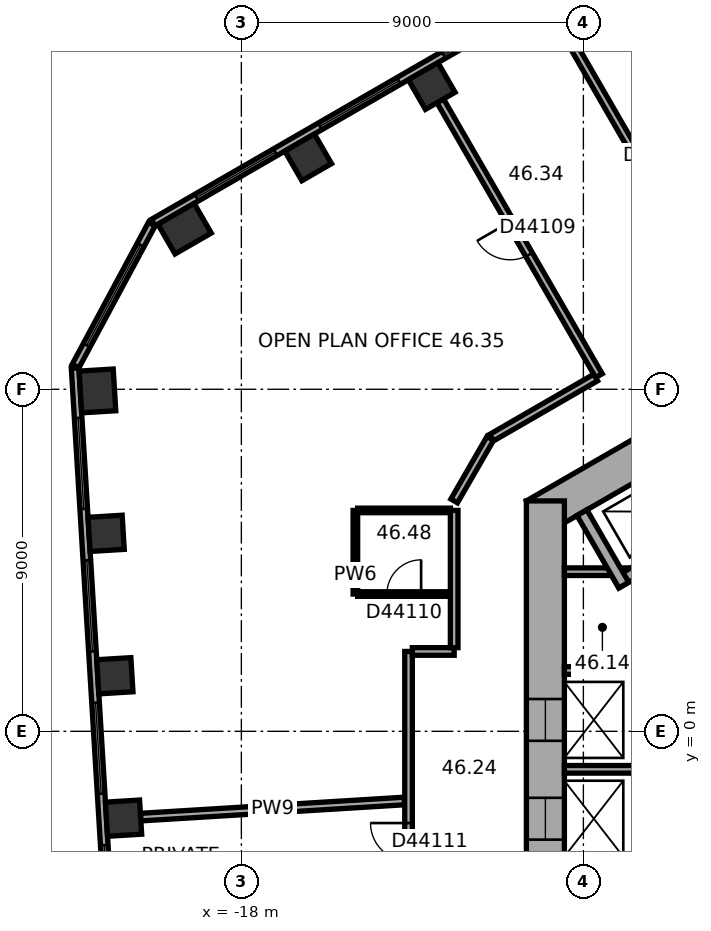
"""IFC4 building model, lengths in metres.
Left out: names, types, materials, properties, quantities, classifications, styles, units other than length and angle.
Written with IfcOpenShell. Run it as: python <this file> out.ifc"""

import sys

from ifc_helpers import new_model, si_unit, direction, frame, frame_2d, origin, origin_2d, place, context, subcontext, project, spatial, rectangle, extrude, element, fill, save


model = new_model("IFC4")
c1 = context("Model", 3, precision=1e-05, world=origin(), true_north=direction((0.0, 1.0)))
c2 = subcontext(c1, "Body", "Model", "MODEL_VIEW")
j1 = project(units=[si_unit("LENGTHUNIT", "METRE"), si_unit("PLANEANGLEUNIT", "RADIAN")], contexts=[c1])
p1 = place(None, origin())
s1 = spatial("IfcSite", under=j1, at=p1, CompositionType="ELEMENT")
p2 = place(p1, origin())
s2 = spatial("IfcBuilding", under=s1, at=p2, CompositionType="ELEMENT")
p3 = place(p2, frame((0.0, 0.0, 187.3)))
s3 = spatial("IfcBuildingStorey", under=s2, at=p3, CompositionType="ELEMENT", Elevation=187.3)
for number, where, z_axis, x_axis in (
    (1, (-12.991, 16.979, 0.0), (0.0, 0.0, 1.0), (-0.866, -0.5, 0.0)),
    (2, (-16.242, 15.102, 0.0), (0.0, 0.0, 1.0), (-0.866, -0.5, 0.0)),
):
    element("IfcColumn", number, at=place(p3, frame(where, z_axis=z_axis, x_axis=x_axis)), inside=s3, PredefinedType="COLUMN", context=c2, shape_type="SweptSolid", body=[
        extrude(rectangle(XDim=0.9, YDim=0.9, at=origin_2d()), origin(), (0.0, 0.0, 1.0), 3.7),
    ])
for number, where, z_axis, x_axis in (
    (3, (-19.494, 13.225, 0.0), (0.0, 0.0, 1.0), (-0.866, -0.5, 0.0)),
    (4, (-21.787, 8.956, 0.0), (0.0, 0.0, 1.0), (0.061, -0.998, 0.0)),
):
    element("IfcColumn", number, at=place(p3, frame(where, z_axis=z_axis, x_axis=x_axis)), inside=s3, PredefinedType="COLUMN", context=c2, shape_type="SweptSolid", body=[
        extrude(rectangle(XDim=1.1, YDim=0.9, at=origin_2d()), origin(), (0.0, 0.0, 1.0), 3.7),
    ])
for number, where, z_axis, x_axis in (
    (5, (-21.558, 5.209, 0.0), (0.0, 0.0, 1.0), (0.061, -0.998, 0.0)),
    (6, (-21.329, 1.462, 0.0), (0.0, 0.0, 1.0), (0.061, -0.998, 0.0)),
    (7, (-21.1, -2.285, 0.0), (0.0, 0.0, 1.0), (0.061, -0.998, 0.0)),
):
    element("IfcColumn", number, at=place(p3, frame(where, z_axis=z_axis, x_axis=x_axis)), inside=s3, PredefinedType="COLUMN", context=c2, shape_type="SweptSolid", body=[
        extrude(rectangle(XDim=0.9, YDim=0.9, at=origin_2d()), origin(), (0.0, 0.0, 1.0), 3.7),
    ])
p4 = place(p3, frame((0.25, 11.691, 0.0), z_axis=(0.0, 0.0, 1.0), x_axis=(-0.866022616891, -0.50000482701, 0.0)))
e8 = element("IfcWall", 8, at=p4, inside=s3, PredefinedType="SHEAR", context=c2, shape_type="SweptSolid", body=[
    extrude(rectangle(XDim=12.125, YDim=1.0, at=frame_2d((6.062, 0.0))), origin(), (0.0, 0.0, 1.0), 3.7),
])
p5 = place(p4, frame((6.262, 0.0, 0.0)))
e9 = element("IfcOpeningElement", 9, at=p5, cuts=e8, PredefinedType="OPENING", context=c2, shape_type="SweptSolid", body=[
    extrude(rectangle(XDim=1.5, YDim=2.1, at=frame_2d((0.75, 1.05))), frame((0.0, 0.51, 0.0), z_axis=(0.0, -1.0, 0.0), x_axis=(1.0, 0.0, 0.0)), (0.0, 0.0, 1.0), 1.02),
])
p6 = place(p4, frame((1.812, 0.0, 0.0)))
e10 = element("IfcOpeningElement", 10, at=p6, cuts=e8, PredefinedType="OPENING", context=c2, shape_type="SweptSolid", body=[
    extrude(rectangle(XDim=0.9, YDim=2.1, at=frame_2d((0.45, 1.05))), frame((0.0, 0.51, 0.0), z_axis=(0.0, -1.0, 0.0), x_axis=(1.0, 0.0, 0.0)), (0.0, 0.0, 1.0), 1.02),
])
p7 = place(p4, frame((4.412, 0.0, 0.0)))
e11 = element("IfcOpeningElement", 11, at=p7, cuts=e8, PredefinedType="OPENING", context=c2, shape_type="SweptSolid", body=[
    extrude(rectangle(XDim=0.9, YDim=2.1, at=frame_2d((0.45, 1.05))), frame((0.0, 0.51, 0.0), z_axis=(0.0, -1.0, 0.0), x_axis=(1.0, 0.0, 0.0)), (0.0, 0.0, 1.0), 1.02),
])
p8 = place(p3, frame((-10.0, 6.062, 0.0), z_axis=(0.0, 0.0, 1.0), x_axis=(0.0, -1.0, 0.0)))
e12 = element("IfcWall", 12, at=p8, inside=s3, PredefinedType="SHEAR", context=c2, shape_type="SweptSolid", body=[
    extrude(rectangle(XDim=12.125, YDim=1.0, at=frame_2d((6.062, 0.0))), origin(), (0.0, 0.0, 1.0), 3.7),
])
p9 = place(p8, frame((5.212, 0.0, 0.0)))
e13 = element("IfcOpeningElement", 13, at=p9, cuts=e12, PredefinedType="OPENING", context=c2, shape_type="SweptSolid", body=[
    extrude(rectangle(XDim=1.1, YDim=2.1, at=frame_2d((0.55, 1.05))), frame((0.0, 0.51, 0.0), z_axis=(0.0, -1.0, 0.0), x_axis=(1.0, 0.0, 0.0)), (0.0, 0.0, 1.0), 1.02),
])
p10 = place(p8, frame((7.812, 0.0, 0.0)))
e14 = element("IfcOpeningElement", 14, at=p10, cuts=e12, PredefinedType="OPENING", context=c2, shape_type="SweptSolid", body=[
    extrude(rectangle(XDim=1.1, YDim=2.1, at=frame_2d((0.55, 1.05))), frame((0.0, 0.51, 0.0), z_axis=(0.0, -1.0, 0.0), x_axis=(1.0, 0.0, 0.0)), (0.0, 0.0, 1.0), 1.02),
])
p11 = place(p3, frame((-2.961, 23.405, 0.0), z_axis=(0.0, 0.0, 1.0), x_axis=(-0.866023315909, -0.500003616288, 0.0)))
e15 = element("IfcWall", 15, at=p11, inside=s3, PredefinedType="STANDARD", context=c2, shape_type="SweptSolid", body=[
    extrude(rectangle(XDim=20.044, YDim=0.2, at=frame_2d((10.022, 0.0))), origin(), (0.0, 0.0, 1.0), 3.7),
])
p12 = place(p11, frame((1.314, 0.0, 0.9)))
e16 = element("IfcOpeningElement", 16, at=p12, cuts=e15, PredefinedType="OPENING", context=c2, shape_type="SweptSolid", body=[
    extrude(rectangle(XDim=2.4, YDim=2.0, at=frame_2d((1.2, 1.0))), frame((0.0, 0.11, 0.0), z_axis=(0.0, -1.0, 0.0), x_axis=(1.0, 0.0, 0.0)), (0.0, 0.0, 1.0), 0.22),
])
p13 = place(p11, frame((5.069, 0.0, 0.9)))
e17 = element("IfcOpeningElement", 17, at=p13, cuts=e15, PredefinedType="OPENING", context=c2, shape_type="SweptSolid", body=[
    extrude(rectangle(XDim=2.4, YDim=2.0, at=frame_2d((1.2, 1.0))), frame((0.0, 0.11, 0.0), z_axis=(0.0, -1.0, 0.0), x_axis=(1.0, 0.0, 0.0)), (0.0, 0.0, 1.0), 0.22),
])
p14 = place(p11, frame((8.823, 0.0, 0.9)))
e18 = element("IfcOpeningElement", 18, at=p14, cuts=e15, PredefinedType="OPENING", context=c2, shape_type="SweptSolid", body=[
    extrude(rectangle(XDim=2.4, YDim=2.0, at=frame_2d((1.2, 1.0))), frame((0.0, 0.11, 0.0), z_axis=(0.0, -1.0, 0.0), x_axis=(1.0, 0.0, 0.0)), (0.0, 0.0, 1.0), 0.22),
])
p15 = place(p11, frame((12.577, 0.0, 0.9)))
e19 = element("IfcOpeningElement", 19, at=p15, cuts=e15, PredefinedType="OPENING", context=c2, shape_type="SweptSolid", body=[
    extrude(rectangle(XDim=2.4, YDim=2.0, at=frame_2d((1.2, 1.0))), frame((0.0, 0.11, 0.0), z_axis=(0.0, -1.0, 0.0), x_axis=(1.0, 0.0, 0.0)), (0.0, 0.0, 1.0), 0.22),
])
p16 = place(p11, frame((16.331, 0.0, 0.9)))
e20 = element("IfcOpeningElement", 20, at=p16, cuts=e15, PredefinedType="OPENING", context=c2, shape_type="SweptSolid", body=[
    extrude(rectangle(XDim=2.4, YDim=2.0, at=frame_2d((1.2, 1.0))), frame((0.0, 0.11, 0.0), z_axis=(0.0, -1.0, 0.0), x_axis=(1.0, 0.0, 0.0)), (0.0, 0.0, 1.0), 0.22),
])
p17 = place(p3, frame((-20.357, 13.344, 0.0), z_axis=(0.0, 0.0, 1.0), x_axis=(-0.473288913494, -0.880907262068, 0.0)))
e21 = element("IfcWall", 21, at=p17, inside=s3, PredefinedType="STANDARD", context=c2, shape_type="SweptSolid", body=[
    extrude(rectangle(XDim=4.238, YDim=0.2, at=frame_2d((2.119, 0.0))), origin(), (0.0, 0.0, 1.0), 3.7),
])
p18 = place(p17, frame((0.619, 0.0, 0.9)))
e22 = element("IfcOpeningElement", 22, at=p18, cuts=e21, PredefinedType="OPENING", context=c2, shape_type="SweptSolid", body=[
    extrude(rectangle(XDim=3.0, YDim=2.0, at=frame_2d((1.5, 1.0))), frame((0.0, 0.11, 0.0), z_axis=(0.0, -1.0, 0.0), x_axis=(1.0, 0.0, 0.0)), (0.0, 0.0, 1.0), 0.22),
])
p19 = place(p3, frame((-22.375, 9.557, 0.0), z_axis=(0.0, 0.0, 1.0), x_axis=(0.061036015339, -0.998135564356, 0.0)))
e23 = element("IfcWall", 23, at=p19, inside=s3, PredefinedType="STANDARD", context=c2, shape_type="SweptSolid", body=[
    extrude(rectangle(XDim=20.044, YDim=0.2, at=frame_2d((10.022, 0.0))), origin(), (0.0, 0.0, 1.0), 3.7),
])
p20 = place(p19, frame((1.313, 0.0, 0.9)))
e24 = element("IfcOpeningElement", 24, at=p20, cuts=e23, PredefinedType="OPENING", context=c2, shape_type="SweptSolid", body=[
    extrude(rectangle(XDim=2.4, YDim=2.0, at=frame_2d((1.2, 1.0))), frame((0.0, 0.11, 0.0), z_axis=(0.0, -1.0, 0.0), x_axis=(1.0, 0.0, 0.0)), (0.0, 0.0, 1.0), 0.22),
])
p21 = place(p19, frame((5.067, 0.0, 0.9)))
e25 = element("IfcOpeningElement", 25, at=p21, cuts=e23, PredefinedType="OPENING", context=c2, shape_type="SweptSolid", body=[
    extrude(rectangle(XDim=2.4, YDim=2.0, at=frame_2d((1.2, 1.0))), frame((0.0, 0.11, 0.0), z_axis=(0.0, -1.0, 0.0), x_axis=(1.0, 0.0, 0.0)), (0.0, 0.0, 1.0), 0.22),
])
p22 = place(p19, frame((8.821, 0.0, 0.9)))
e26 = element("IfcOpeningElement", 26, at=p22, cuts=e23, PredefinedType="OPENING", context=c2, shape_type="SweptSolid", body=[
    extrude(rectangle(XDim=2.4, YDim=2.0, at=frame_2d((1.2, 1.0))), frame((0.0, 0.11, 0.0), z_axis=(0.0, -1.0, 0.0), x_axis=(1.0, 0.0, 0.0)), (0.0, 0.0, 1.0), 0.22),
])
p23 = place(p19, frame((12.575, 0.0, 0.9)))
e27 = element("IfcOpeningElement", 27, at=p23, cuts=e23, PredefinedType="OPENING", context=c2, shape_type="SweptSolid", body=[
    extrude(rectangle(XDim=2.4, YDim=2.0, at=frame_2d((1.2, 1.0))), frame((0.0, 0.11, 0.0), z_axis=(0.0, -1.0, 0.0), x_axis=(1.0, 0.0, 0.0)), (0.0, 0.0, 1.0), 0.22),
])
p24 = place(p19, frame((16.329, 0.0, 0.9)))
e28 = element("IfcOpeningElement", 28, at=p24, cuts=e23, PredefinedType="OPENING", context=c2, shape_type="SweptSolid", body=[
    extrude(rectangle(XDim=2.4, YDim=2.0, at=frame_2d((1.2, 1.0))), frame((0.0, 0.11, 0.0), z_axis=(0.0, -1.0, 0.0), x_axis=(1.0, 0.0, 0.0)), (0.0, 0.0, 1.0), 0.22),
])
for number, where, z_axis, x_axis in (
    (29, (-7.3, 4.2, 0.0), (0.0, 0.0, 1.0), (-1.0, 0.0, 0.0)),
    (30, (-7.3, 1.6, 0.0), (0.0, 0.0, 1.0), (-1.0, 0.0, 0.0)),
    (31, (-7.3, -1.0, 0.0), (0.0, 0.0, 1.0), (-1.0, 0.0, 0.0)),
):
    element("IfcWall", number, at=place(p3, frame(where, z_axis=z_axis, x_axis=x_axis)), inside=s3, PredefinedType="PARTITIONING", context=c2, shape_type="SweptSolid", body=[
        extrude(rectangle(XDim=2.2, YDim=0.2, at=frame_2d((1.1, 0.0))), origin(), (0.0, 0.0, 1.0), 3.42),
    ])
p25 = place(p3, frame((-5.24, 5.577, 0.0), z_axis=(0.0, 0.0, 1.0), x_axis=(-0.866014461049, -0.500018952895, 0.0)))
e32 = element("IfcWall", 32, at=p25, inside=s3, PredefinedType="SHEAR", context=c2, shape_type="SweptSolid", body=[
    extrude(rectangle(XDim=3.35, YDim=0.3, at=frame_2d((1.675, 0.0))), origin(), (0.0, 0.0, 1.0), 3.42),
])
p26 = place(p3, frame((-7.937, 3.847, 0.0), z_axis=(0.0, 0.0, 1.0), x_axis=(-0.50002983664, 0.866008176907, 0.0)))
e33 = element("IfcWall", 33, at=p26, inside=s3, PredefinedType="SHEAR", context=c2, shape_type="SweptSolid", body=[
    extrude(rectangle(XDim=2.2, YDim=0.3, at=frame_2d((1.1, 0.0))), origin(), (0.0, 0.0, 1.0), 3.42),
])
p27 = place(p3, frame((-20.651, -2.258, 0.0), z_axis=(0.0, 0.0, 1.0), x_axis=(0.998133960965, 0.061062230286, 0.0)))
e34 = element("IfcWall", 34, at=p27, inside=s3, PredefinedType="PARTITIONING", context=c2, shape_type="SweptSolid", body=[
    extrude(rectangle(XDim=6.953, YDim=0.2, at=frame_2d((3.477, 0.0))), origin(), (0.0, 0.0, 1.0), 3.42),
])
p28 = place(p3, frame((-15.0, 3.612, 0.0), z_axis=(0.0, 0.0, 1.0), x_axis=(0.0, 1.0, 0.0)))
e35 = element("IfcWall", 35, at=p28, inside=s3, PredefinedType="PARTITIONING", context=c2, shape_type="SweptSolid", body=[
    extrude(rectangle(XDim=2.2, YDim=0.12, at=frame_2d((1.1, 0.0))), origin(), (0.0, 0.0, 1.0), 3.42),
])
p29 = place(p3, frame((-14.94, 5.812, 0.0), z_axis=(0.0, 0.0, 1.0), x_axis=(1.0, 0.0, 0.0)))
e36 = element("IfcWall", 36, at=p29, inside=s3, PredefinedType="PARTITIONING", context=c2, shape_type="SweptSolid", body=[
    extrude(rectangle(XDim=2.44, YDim=0.12, at=frame_2d((1.22, 0.0))), origin(), (0.0, 0.0, 1.0), 3.42),
])
p30 = place(p3, frame((-13.601, 2.101, 0.0), z_axis=(0.0, 0.0, 1.0), x_axis=(0.0, -1.0, 0.0)))
e37 = element("IfcWall", 37, at=p30, inside=s3, PredefinedType="PARTITIONING", context=c2, shape_type="SweptSolid", body=[
    extrude(rectangle(XDim=6.102, YDim=0.2, at=frame_2d((3.051, 0.0))), origin(), (0.0, 0.0, 1.0), 3.42),
])
p31 = place(p30, frame((4.515, 0.0, 0.0)))
e38 = element("IfcOpeningElement", 38, at=p31, cuts=e37, PredefinedType="OPENING", context=c2, shape_type="SweptSolid", body=[
    extrude(rectangle(XDim=1.0, YDim=2.1, at=frame_2d((0.5, 1.05))), frame((0.0, 0.11, 0.0), z_axis=(0.0, -1.0, 0.0), x_axis=(1.0, 0.0, 0.0)), (0.0, 0.0, 1.0), 0.22),
])
p32 = place(p3, frame((-12.766, 16.589, 0.0), z_axis=(0.0, 0.0, 1.0), x_axis=(0.500010139422, -0.866019549707, 0.0)))
e39 = element("IfcWall", 39, at=p32, inside=s3, PredefinedType="PARTITIONING", context=c2, shape_type="SweptSolid", body=[
    extrude(rectangle(XDim=8.35, YDim=0.2, at=frame_2d((4.175, 0.0))), origin(), (0.0, 0.0, 1.0), 3.42),
])
p33 = place(p32, frame((3.675, 0.0, 0.0)))
e40 = element("IfcOpeningElement", 40, at=p33, cuts=e39, PredefinedType="OPENING", context=c2, shape_type="SweptSolid", body=[
    extrude(rectangle(XDim=1.0, YDim=2.1, at=frame_2d((0.5, 1.05))), frame((0.0, 0.11, 0.0), z_axis=(0.0, -1.0, 0.0), x_axis=(1.0, 0.0, 0.0)), (0.0, 0.0, 1.0), 0.22),
])
p34 = place(p3, frame((-12.5, 3.612, 0.0), z_axis=(0.0, 0.0, 1.0), x_axis=(-1.0, 0.0, 0.0)))
e41 = element("IfcWall", 41, at=p34, inside=s3, PredefinedType="PARTITIONING", context=c2, shape_type="SweptSolid", body=[
    extrude(rectangle(XDim=2.44, YDim=0.12, at=frame_2d((1.22, 0.0))), origin(), (0.0, 0.0, 1.0), 3.42),
])
p35 = place(p34, frame((0.77, 0.0, 0.0)))
e42 = element("IfcOpeningElement", 42, at=p35, cuts=e41, PredefinedType="OPENING", context=c2, shape_type="SweptSolid", body=[
    extrude(rectangle(XDim=0.9, YDim=2.1, at=frame_2d((0.45, 1.05))), frame((0.0, 0.07, 0.0), z_axis=(0.0, -1.0, 0.0), x_axis=(1.0, 0.0, 0.0)), (0.0, 0.0, 1.0), 0.14),
])
p36 = place(p3, frame((-12.4, 2.101, 0.0), z_axis=(0.0, 0.0, 1.0), x_axis=(-1.0, 0.0, 0.0)))
e43 = element("IfcWall", 43, at=p36, inside=s3, PredefinedType="PARTITIONING", context=c2, shape_type="SweptSolid", body=[
    extrude(rectangle(XDim=1.101, YDim=0.2, at=frame_2d((0.551, 0.0))), origin(), (0.0, 0.0, 1.0), 3.42),
])
p37 = place(p3, frame((-12.4, 5.812, 0.0), z_axis=(0.0, 0.0, 1.0), x_axis=(0.0, -1.0, 0.0)))
e44 = element("IfcWall", 44, at=p37, inside=s3, PredefinedType="PARTITIONING", context=c2, shape_type="SweptSolid", body=[
    extrude(rectangle(XDim=3.611, YDim=0.2, at=frame_2d((1.806, 0.0))), origin(), (0.0, 0.0, 1.0), 3.42),
])
p38 = place(p3, frame((-11.45, 7.708, 0.0), z_axis=(0.0, 0.0, 1.0), x_axis=(-0.500022797313, -0.86601224135, 0.0)))
e45 = element("IfcWall", 45, at=p38, inside=s3, PredefinedType="PARTITIONING", context=c2, shape_type="SweptSolid", body=[
    extrude(rectangle(XDim=1.9, YDim=0.2, at=frame_2d((0.95, 0.0))), origin(), (0.0, 0.0, 1.0), 3.42),
])
p39 = place(p3, frame((-9.515, 18.466, 0.0), z_axis=(0.0, 0.0, 1.0), x_axis=(0.500010139422, -0.866019549707, 0.0)))
e46 = element("IfcWall", 46, at=p39, inside=s3, PredefinedType="PARTITIONING", context=c2, shape_type="SweptSolid", body=[
    extrude(rectangle(XDim=8.35, YDim=0.2, at=frame_2d((4.175, 0.0))), origin(), (0.0, 0.0, 1.0), 2.87),
])
p40 = place(p39, frame((3.675, 0.0, 0.0)))
e47 = element("IfcOpeningElement", 47, at=p40, cuts=e46, PredefinedType="OPENING", context=c2, shape_type="SweptSolid", body=[
    extrude(rectangle(XDim=1.0, YDim=2.1, at=frame_2d((0.5, 1.05))), frame((0.0, 0.11, 0.0), z_axis=(0.0, -1.0, 0.0), x_axis=(1.0, 0.0, 0.0)), (0.0, 0.0, 1.0), 0.22),
])
p41 = place(p3, frame((-8.678, 9.308, 0.0), z_axis=(0.0, 0.0, 1.0), x_axis=(-0.866000359435, -0.500043375578, 0.0)))
e48 = element("IfcWall", 48, at=p41, inside=s3, PredefinedType="PARTITIONING", context=c2, shape_type="SweptSolid", body=[
    extrude(rectangle(XDim=3.161, YDim=0.2, at=frame_2d((1.581, 0.0))), origin(), (0.0, 0.0, 1.0), 3.42),
])
p42 = place(p14, origin())
e49 = element("IfcWindow", 49, at=p42, inside=s3, PartitioningType="SINGLE_PANEL", PredefinedType="WINDOW", context=c2, shape_type="SweptSolid", body=[
    extrude(rectangle(XDim=2.4, YDim=2.0, at=frame_2d((1.2, 1.0))), frame((0.0, 0.03, 0.0), z_axis=(0.0, -1.0, 0.0), x_axis=(1.0, 0.0, 0.0)), (0.0, 0.0, 1.0), 0.06),
])
fill(e18, e49)
p43 = place(p15, origin())
e50 = element("IfcWindow", 50, at=p43, inside=s3, PartitioningType="SINGLE_PANEL", PredefinedType="WINDOW", context=c2, shape_type="SweptSolid", body=[
    extrude(rectangle(XDim=2.4, YDim=2.0, at=frame_2d((1.2, 1.0))), frame((0.0, 0.03, 0.0), z_axis=(0.0, -1.0, 0.0), x_axis=(1.0, 0.0, 0.0)), (0.0, 0.0, 1.0), 0.06),
])
fill(e19, e50)
p44 = place(p16, origin())
e51 = element("IfcWindow", 51, at=p44, inside=s3, PartitioningType="SINGLE_PANEL", PredefinedType="WINDOW", context=c2, shape_type="SweptSolid", body=[
    extrude(rectangle(XDim=2.4, YDim=2.0, at=frame_2d((1.2, 1.0))), frame((0.0, 0.03, 0.0), z_axis=(0.0, -1.0, 0.0), x_axis=(1.0, 0.0, 0.0)), (0.0, 0.0, 1.0), 0.06),
])
fill(e20, e51)
p45 = place(p18, origin())
e52 = element("IfcWindow", 52, at=p45, inside=s3, PartitioningType="SINGLE_PANEL", PredefinedType="WINDOW", context=c2, shape_type="SweptSolid", body=[
    extrude(rectangle(XDim=3.0, YDim=2.0, at=frame_2d((1.5, 1.0))), frame((0.0, 0.03, 0.0), z_axis=(0.0, -1.0, 0.0), x_axis=(1.0, 0.0, 0.0)), (0.0, 0.0, 1.0), 0.06),
])
fill(e22, e52)
p46 = place(p20, origin())
e53 = element("IfcWindow", 53, at=p46, inside=s3, PartitioningType="SINGLE_PANEL", PredefinedType="WINDOW", context=c2, shape_type="SweptSolid", body=[
    extrude(rectangle(XDim=2.4, YDim=2.0, at=frame_2d((1.2, 1.0))), frame((0.0, 0.03, 0.0), z_axis=(0.0, -1.0, 0.0), x_axis=(1.0, 0.0, 0.0)), (0.0, 0.0, 1.0), 0.06),
])
fill(e24, e53)
p47 = place(p21, origin())
e54 = element("IfcWindow", 54, at=p47, inside=s3, PartitioningType="SINGLE_PANEL", PredefinedType="WINDOW", context=c2, shape_type="SweptSolid", body=[
    extrude(rectangle(XDim=2.4, YDim=2.0, at=frame_2d((1.2, 1.0))), frame((0.0, 0.03, 0.0), z_axis=(0.0, -1.0, 0.0), x_axis=(1.0, 0.0, 0.0)), (0.0, 0.0, 1.0), 0.06),
])
fill(e25, e54)
p48 = place(p22, origin())
e55 = element("IfcWindow", 55, at=p48, inside=s3, PartitioningType="SINGLE_PANEL", PredefinedType="WINDOW", context=c2, shape_type="SweptSolid", body=[
    extrude(rectangle(XDim=2.4, YDim=2.0, at=frame_2d((1.2, 1.0))), frame((0.0, 0.03, 0.0), z_axis=(0.0, -1.0, 0.0), x_axis=(1.0, 0.0, 0.0)), (0.0, 0.0, 1.0), 0.06),
])
fill(e26, e55)
p49 = place(p23, origin())
e56 = element("IfcWindow", 56, at=p49, inside=s3, PartitioningType="SINGLE_PANEL", PredefinedType="WINDOW", context=c2, shape_type="SweptSolid", body=[
    extrude(rectangle(XDim=2.4, YDim=2.0, at=frame_2d((1.2, 1.0))), frame((0.0, 0.03, 0.0), z_axis=(0.0, -1.0, 0.0), x_axis=(1.0, 0.0, 0.0)), (0.0, 0.0, 1.0), 0.06),
])
fill(e27, e56)
p50 = place(p9, origin())
e57 = element("IfcDoor", 57, at=p50, inside=s3, OperationType="DOUBLE_DOOR_SLIDING", PredefinedType="DOOR", context=c2, shape_type="SweptSolid", body=[
    extrude(rectangle(XDim=1.1, YDim=2.1, at=frame_2d((0.55, 1.05))), frame((0.0, 0.025, 0.0), z_axis=(0.0, -1.0, 0.0), x_axis=(1.0, 0.0, 0.0)), (0.0, 0.0, 1.0), 0.05),
])
fill(e13, e57)
p51 = place(p10, origin())
e58 = element("IfcDoor", 58, at=p51, inside=s3, OperationType="DOUBLE_DOOR_SLIDING", PredefinedType="DOOR", context=c2, shape_type="SweptSolid", body=[
    extrude(rectangle(XDim=1.1, YDim=2.1, at=frame_2d((0.55, 1.05))), frame((0.0, 0.025, 0.0), z_axis=(0.0, -1.0, 0.0), x_axis=(1.0, 0.0, 0.0)), (0.0, 0.0, 1.0), 0.05),
])
fill(e14, e58)
p52 = place(p33, origin())
e59 = element("IfcDoor", 59, at=p52, inside=s3, OperationType="SINGLE_SWING_LEFT", PredefinedType="DOOR", context=c2, shape_type="SweptSolid", body=[
    extrude(rectangle(XDim=1.0, YDim=2.1, at=frame_2d((0.5, 1.05))), frame((0.0, 0.025, 0.0), z_axis=(0.0, -1.0, 0.0), x_axis=(1.0, 0.0, 0.0)), (0.0, 0.0, 1.0), 0.05),
])
fill(e40, e59)
p53 = place(p35, origin())
e60 = element("IfcDoor", 60, at=p53, inside=s3, OperationType="SINGLE_SWING_LEFT", PredefinedType="DOOR", context=c2, shape_type="SweptSolid", body=[
    extrude(rectangle(XDim=0.9, YDim=2.1, at=frame_2d((0.45, 1.05))), frame((0.0, 0.025, 0.0), z_axis=(0.0, -1.0, 0.0), x_axis=(1.0, 0.0, 0.0)), (0.0, 0.0, 1.0), 0.05),
])
fill(e42, e60)
p54 = place(p31, origin())
e61 = element("IfcDoor", 61, at=p54, inside=s3, OperationType="SINGLE_SWING_LEFT", PredefinedType="DOOR", context=c2, shape_type="SweptSolid", body=[
    extrude(rectangle(XDim=1.0, YDim=2.1, at=frame_2d((0.5, 1.05))), frame((0.0, 0.025, 0.0), z_axis=(0.0, -1.0, 0.0), x_axis=(1.0, 0.0, 0.0)), (0.0, 0.0, 1.0), 0.05),
])
fill(e38, e61)
save(model, sys.argv[1])
